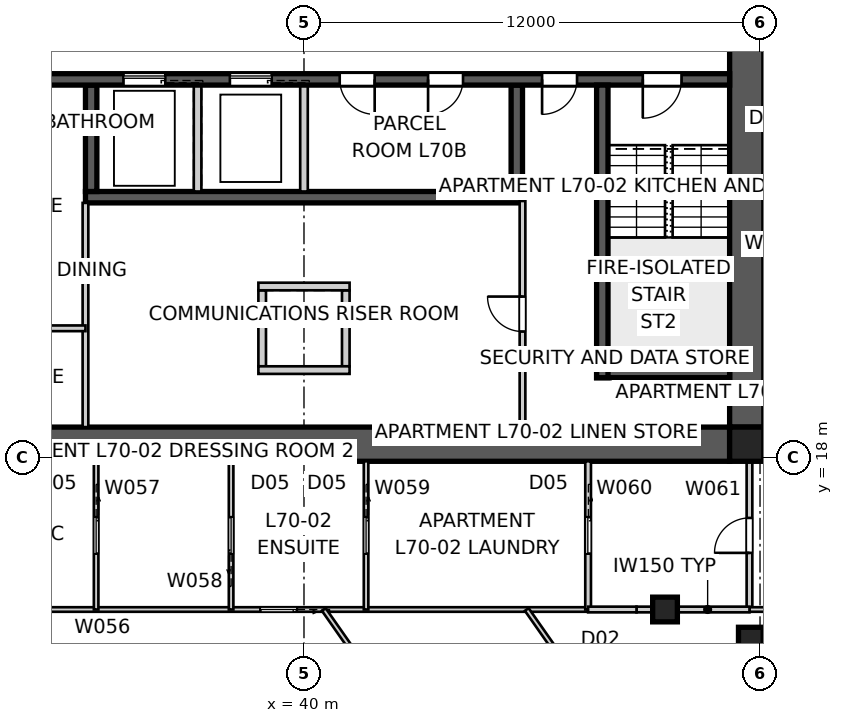
"""IFC4 building model, lengths in metres.
Left out: names, types, materials, properties, quantities, classifications, styles, units other than length and angle.
Written with IfcOpenShell. Run it as: python <this file> out.ifc"""

import sys

from ifc_helpers import new_model, si_unit, direction, frame, frame_2d, origin, origin_2d, place, context, subcontext, project, spatial, polyline, rectangle, outline, extrude, element, fill, save


model = new_model("IFC4")
c1 = context("Model", 3, precision=1e-05, world=origin(), true_north=direction((0.0, 1.0)))
c2 = subcontext(c1, "Body", "Model", "MODEL_VIEW")
j1 = project(units=[si_unit("LENGTHUNIT", "METRE"), si_unit("PLANEANGLEUNIT", "RADIAN")], contexts=[c1])
p1 = place(None, origin())
s1 = spatial("IfcSite", under=j1, at=p1, CompositionType="ELEMENT")
p2 = place(p1, origin())
s2 = spatial("IfcBuilding", under=s1, at=p2, CompositionType="ELEMENT")
p3 = place(p2, frame((0.0, 0.0, 254.0)))
s3 = spatial("IfcBuildingStorey", under=s2, at=p3, CompositionType="ELEMENT", Elevation=254.0)
p4 = place(p3, frame((51.2, 18.35, 0.0), z_axis=(0.0, 0.0, 1.0), x_axis=(-1.0, 0.0, 0.0)))
e1 = element("IfcWall", 1, at=p4, inside=s3, PredefinedType="SHEAR", context=c2, shape_type="SweptSolid", body=[
    extrude(outline(polyline([(0.0, -0.45), (22.4, -0.45), (22.4, -0.025), (22.85, -0.025), (22.85, 0.025), (22.4, 0.025), (22.4, 0.45), (0.0, 0.45), (0.0, 0.025), (-0.45, 0.025), (-0.45, -0.025), (0.0, -0.025), (0.0, -0.45)])), origin(), (0.0, 0.0, 1.0), 3.4),
])
p5 = place(p3, frame((51.65, 18.8, 0.0), z_axis=(0.0, 0.0, 1.0), x_axis=(0.0, 1.0, 0.0)))
e2 = element("IfcWall", 2, at=p5, inside=s3, PredefinedType="SHEAR", context=c2, shape_type="SweptSolid", body=[
    extrude(outline(polyline([(0.0, -0.45), (22.4, -0.45), (22.4, -0.025), (22.85, -0.025), (22.85, 0.025), (22.4, 0.025), (22.4, 0.45), (0.0, 0.45), (0.0, 0.025), (-0.45, 0.025), (-0.45, -0.025), (0.0, -0.025), (0.0, -0.45)])), origin(), (0.0, 0.0, 1.0), 3.4),
])
p6 = place(p5, frame((11.14, 0.0, 0.0)))
e3 = element("IfcOpeningElement", 3, at=p6, cuts=e2, PredefinedType="OPENING", context=c2, shape_type="SweptSolid", body=[
    extrude(rectangle(XDim=1.02, YDim=2.4, at=frame_2d((0.51, 1.2))), frame((0.0, 0.46, 0.0), z_axis=(0.0, -1.0, 0.0), x_axis=(1.0, 0.0, 0.0)), (0.0, 0.0, 1.0), 0.92),
])
p7 = place(p3, frame((51.2, 27.95, 0.0), z_axis=(0.0, 0.0, 1.0), x_axis=(-1.0, 0.0, 0.0)))
e4 = element("IfcWall", 4, at=p7, inside=s3, PredefinedType="SHEAR", context=c2, shape_type="SweptSolid", body=[
    extrude(rectangle(XDim=22.4, YDim=0.3, at=frame_2d((11.2, 0.0))), origin(), (0.0, 0.0, 1.0), 3.4),
])
p8 = place(p7, frame((19.04, 0.0, 0.0)))
e5 = element("IfcOpeningElement", 5, at=p8, cuts=e4, PredefinedType="OPENING", context=c2, shape_type="SweptSolid", body=[
    extrude(rectangle(XDim=0.92, YDim=2.1, at=frame_2d((0.46, 1.05))), frame((0.0, 0.16, 0.0), z_axis=(0.0, -1.0, 0.0), x_axis=(1.0, 0.0, 0.0)), (0.0, 0.0, 1.0), 0.32),
])
p9 = place(p7, frame((1.265, 0.0, 0.0)))
e6 = element("IfcOpeningElement", 6, at=p9, cuts=e4, PredefinedType="OPENING", context=c2, shape_type="SweptSolid", body=[
    extrude(rectangle(XDim=1.02, YDim=2.1, at=frame_2d((0.51, 1.05))), frame((0.0, 0.16, 0.0), z_axis=(0.0, -1.0, 0.0), x_axis=(1.0, 0.0, 0.0)), (0.0, 0.0, 1.0), 0.32),
])
p10 = place(p7, frame((4.015, 0.0, 0.0)))
e7 = element("IfcOpeningElement", 7, at=p10, cuts=e4, PredefinedType="OPENING", context=c2, shape_type="SweptSolid", body=[
    extrude(rectangle(XDim=0.92, YDim=2.1, at=frame_2d((0.46, 1.05))), frame((0.0, 0.16, 0.0), z_axis=(0.0, -1.0, 0.0), x_axis=(1.0, 0.0, 0.0)), (0.0, 0.0, 1.0), 0.32),
])
p11 = place(p7, frame((9.34, 0.0, 0.0)))
e8 = element("IfcOpeningElement", 8, at=p11, cuts=e4, PredefinedType="OPENING", context=c2, shape_type="SweptSolid", body=[
    extrude(rectangle(XDim=0.92, YDim=2.1, at=frame_2d((0.46, 1.05))), frame((0.0, 0.16, 0.0), z_axis=(0.0, -1.0, 0.0), x_axis=(1.0, 0.0, 0.0)), (0.0, 0.0, 1.0), 0.32),
])
p12 = place(p7, frame((7.015, 0.0, 0.0)))
e9 = element("IfcOpeningElement", 9, at=p12, cuts=e4, PredefinedType="OPENING", context=c2, shape_type="SweptSolid", body=[
    extrude(rectangle(XDim=0.92, YDim=2.1, at=frame_2d((0.46, 1.05))), frame((0.0, 0.16, 0.0), z_axis=(0.0, -1.0, 0.0), x_axis=(1.0, 0.0, 0.0)), (0.0, 0.0, 1.0), 0.32),
])
p13 = place(p7, frame((12.05, 0.0, 0.0)))
e10 = element("IfcOpeningElement", 10, at=p13, cuts=e4, PredefinedType="OPENING", context=c2, shape_type="SweptSolid", body=[
    extrude(rectangle(XDim=1.1, YDim=2.1, at=frame_2d((0.55, 1.05))), frame((0.0, 0.16, 0.0), z_axis=(0.0, -1.0, 0.0), x_axis=(1.0, 0.0, 0.0)), (0.0, 0.0, 1.0), 0.32),
])
p14 = place(p7, frame((14.85, 0.0, 0.0)))
e11 = element("IfcOpeningElement", 11, at=p14, cuts=e4, PredefinedType="OPENING", context=c2, shape_type="SweptSolid", body=[
    extrude(rectangle(XDim=1.1, YDim=2.1, at=frame_2d((0.55, 1.05))), frame((0.0, 0.16, 0.0), z_axis=(0.0, -1.0, 0.0), x_axis=(1.0, 0.0, 0.0)), (0.0, 0.0, 1.0), 0.32),
])
p15 = place(p3, frame((45.75, 24.85, 0.0), z_axis=(0.0, 0.0, 1.0), x_axis=(-1.0, 0.0, 0.0)))
e12 = element("IfcWall", 12, at=p15, inside=s3, PredefinedType="SHEAR", context=c2, shape_type="SweptSolid", body=[
    extrude(rectangle(XDim=11.5, YDim=0.3, at=frame_2d((5.75, 0.0))), origin(), (0.0, 0.0, 1.0), 3.4),
])
p16 = place(p3, frame((45.6, 27.8, 0.0), z_axis=(0.0, 0.0, 1.0), x_axis=(0.0, -1.0, 0.0)))
e13 = element("IfcWall", 13, at=p16, inside=s3, PredefinedType="SHEAR", context=c2, shape_type="SweptSolid", body=[
    extrude(rectangle(XDim=2.8, YDim=0.3, at=frame_2d((1.4, 0.0))), origin(), (0.0, 0.0, 1.0), 3.4),
])
for number, where, z_axis, x_axis in (
    (14, (40.0, 27.8, 0.0), (0.0, 0.0, 1.0), (0.0, -1.0, 0.0)),
    (15, (37.2, 27.8, 0.0), (0.0, 0.0, 1.0), (0.0, -1.0, 0.0)),
):
    element("IfcWall", number, at=place(p3, frame(where, z_axis=z_axis, x_axis=x_axis)), inside=s3, PredefinedType="SOLIDWALL", context=c2, shape_type="SweptSolid", body=[
        extrude(rectangle(XDim=2.8, YDim=0.2, at=frame_2d((1.4, 0.0))), origin(), (0.0, 0.0, 1.0), 3.4),
    ])
p17 = place(p3, frame((34.4, 27.8, 0.0), z_axis=(0.0, 0.0, 1.0), x_axis=(0.0, -1.0, 0.0)))
e16 = element("IfcWall", 16, at=p17, inside=s3, PredefinedType="SHEAR", context=c2, shape_type="SweptSolid", body=[
    extrude(rectangle(XDim=2.8, YDim=0.3, at=frame_2d((1.4, 0.0))), origin(), (0.0, 0.0, 1.0), 3.4),
])
p18 = place(p3, frame((47.85, 27.8, 0.0), z_axis=(0.0, 0.0, 1.0), x_axis=(0.0, -1.0, 0.0)))
e17 = element("IfcWall", 17, at=p18, inside=s3, PredefinedType="SHEAR", context=c2, shape_type="SweptSolid", body=[
    extrude(rectangle(XDim=7.7, YDim=0.3, at=frame_2d((3.85, 0.0))), origin(), (0.0, 0.0, 1.0), 3.4),
])
p19 = place(p3, frame((51.2, 20.25, 0.0), z_axis=(0.0, 0.0, 1.0), x_axis=(-1.0, 0.0, 0.0)))
e18 = element("IfcWall", 18, at=p19, inside=s3, PredefinedType="SHEAR", context=c2, shape_type="SweptSolid", body=[
    extrude(rectangle(XDim=3.5, YDim=0.3, at=frame_2d((1.75, 0.0))), origin(), (0.0, 0.0, 1.0), 3.4),
])
for number, where, z_axis, x_axis in (
    (19, (38.9, 22.4, 0.0), (0.0, 0.0, 1.0), (0.0, -1.0, 0.0)),
    (20, (41.1, 22.4, 0.0), (0.0, 0.0, 1.0), (0.0, -1.0, 0.0)),
):
    element("IfcWall", number, at=place(p3, frame(where, z_axis=z_axis, x_axis=x_axis)), inside=s3, PredefinedType="SOLIDWALL", context=c2, shape_type="SweptSolid", body=[
        extrude(rectangle(XDim=2.0, YDim=0.2, at=frame_2d((1.0, 0.0))), origin(), (0.0, 0.0, 1.0), 3.4),
    ])
for number, where, z_axis, x_axis in (
    (21, (38.8, 22.5, 0.0), (0.0, 0.0, 1.0), (1.0, 0.0, 0.0)),
    (22, (38.8, 20.3, 0.0), (0.0, 0.0, 1.0), (1.0, 0.0, 0.0)),
):
    element("IfcWall", number, at=place(p3, frame(where, z_axis=z_axis, x_axis=x_axis)), inside=s3, PredefinedType="SOLIDWALL", context=c2, shape_type="SweptSolid", body=[
        extrude(rectangle(XDim=2.4, YDim=0.2, at=frame_2d((1.2, 0.0))), origin(), (0.0, 0.0, 1.0), 3.4),
    ])
p20 = place(p3, frame((51.65, 18.35, 0.0), z_axis=(0.0, 0.0, 1.0), x_axis=(1.0, 0.0, 0.0)))
e23 = element("IfcColumn", 23, at=p20, inside=s3, PredefinedType="COLUMN", context=c2, shape_type="SweptSolid", body=[
    extrude(rectangle(XDim=0.9, YDim=0.9, at=origin_2d()), origin(), (0.0, 0.0, 1.0), 3.4),
])
for number, where, z_axis, x_axis in (
    (24, (51.758, 13.207, 0.0), (0.0, 0.0, 1.0), (1.0, 0.0, 0.0)),
    (25, (49.5, 14.0, 0.0), (0.0, 0.0, 1.0), (1.0, 0.0, 0.0)),
):
    element("IfcColumn", number, at=place(p3, frame(where, z_axis=z_axis, x_axis=x_axis)), inside=s3, PredefinedType="COLUMN", context=c2, shape_type="SweptSolid", body=[
        extrude(rectangle(XDim=0.65, YDim=0.65, at=origin_2d()), origin(), (0.0, 0.0, 1.0), 3.4),
    ])
p21 = place(p3, frame((45.75, 18.8, 0.0), z_axis=(0.0, 0.0, 1.0), x_axis=(0.0, 1.0, 0.0)))
e26 = element("IfcWall", 26, at=p21, inside=s3, PredefinedType="SOLIDWALL", context=c2, shape_type="SweptSolid", body=[
    extrude(rectangle(XDim=5.95, YDim=0.15, at=frame_2d((2.975, 0.0))), origin(), (0.0, 0.0, 1.0), 3.25),
])
p22 = place(p21, frame((2.515, 0.0, 0.0)))
e27 = element("IfcOpeningElement", 27, at=p22, cuts=e26, PredefinedType="OPENING", context=c2, shape_type="SweptSolid", body=[
    extrude(rectangle(XDim=0.92, YDim=2.1, at=frame_2d((0.46, 1.05))), frame((0.0, 0.085, 0.0), z_axis=(0.0, -1.0, 0.0), x_axis=(1.0, 0.0, 0.0)), (0.0, 0.0, 1.0), 0.17),
])
p23 = place(p3, frame((34.25, 18.8, 0.0), z_axis=(0.0, 0.0, 1.0), x_axis=(0.0, 1.0, 0.0)))
e28 = element("IfcWall", 28, at=p23, inside=s3, PredefinedType="SOLIDWALL", context=c2, shape_type="SweptSolid", body=[
    extrude(rectangle(XDim=5.9, YDim=0.15, at=frame_2d((2.95, 0.0))), origin(), (0.0, 0.0, 1.0), 3.25),
])
p24 = place(p3, frame((34.25, 21.4, 0.0), z_axis=(0.0, 0.0, 1.0), x_axis=(-1.0, 0.0, 0.0)))
e29 = element("IfcWall", 29, at=p24, inside=s3, PredefinedType="SOLIDWALL", context=c2, shape_type="SweptSolid", body=[
    extrude(rectangle(XDim=5.45, YDim=0.15, at=frame_2d((2.725, 0.0))), origin(), (0.0, 0.0, 1.0), 3.25),
])
p25 = place(p24, frame((2.265, 0.0, 0.0)))
e30 = element("IfcOpeningElement", 30, at=p25, cuts=e29, PredefinedType="OPENING", context=c2, shape_type="SweptSolid", body=[
    extrude(rectangle(XDim=0.92, YDim=2.1, at=frame_2d((0.46, 1.05))), frame((0.0, 0.085, 0.0), z_axis=(0.0, -1.0, 0.0), x_axis=(1.0, 0.0, 0.0)), (0.0, 0.0, 1.0), 0.17),
])
p26 = place(p3, frame((47.476, 14.0, 0.0), z_axis=(0.0, 0.0, 1.0), x_axis=(-1.0, 0.0, 0.0)))
e31 = element("IfcWall", 31, at=p26, inside=s3, PredefinedType="PARTITIONING", context=c2, shape_type="SweptSolid", body=[
    extrude(rectangle(XDim=22.471, YDim=0.12, at=frame_2d((11.235, 0.0))), origin(), (0.0, 0.0, 1.0), 2.549),
])
p27 = place(p26, frame((7.664, 0.0, 0.0)))
e32 = element("IfcOpeningElement", 32, at=p27, cuts=e31, PredefinedType="OPENING", context=c2, shape_type="SweptSolid", body=[
    extrude(rectangle(XDim=0.96, YDim=2.1, at=frame_2d((0.48, 1.05))), frame((0.0, 0.07, 0.0), z_axis=(0.0, -1.0, 0.0), x_axis=(1.0, 0.0, 0.0)), (0.0, 0.0, 1.0), 0.14),
])
p28 = place(p3, frame((34.53, 17.9, 0.0), z_axis=(0.0, 0.0, 1.0), x_axis=(0.0, -1.0, 0.0)))
e33 = element("IfcWall", 33, at=p28, inside=s3, PredefinedType="PARTITIONING", context=c2, shape_type="SweptSolid", body=[
    extrude(rectangle(XDim=3.9, YDim=0.12, at=frame_2d((1.95, 0.0))), origin(), (0.0, 0.0, 1.0), 3.25),
])
p29 = place(p28, frame((1.47, 0.0, 0.0)))
e34 = element("IfcOpeningElement", 34, at=p29, cuts=e33, PredefinedType="OPENING", context=c2, shape_type="SweptSolid", body=[
    extrude(rectangle(XDim=0.96, YDim=2.1, at=frame_2d((0.48, 1.05))), frame((0.0, 0.07, 0.0), z_axis=(0.0, -1.0, 0.0), x_axis=(1.0, 0.0, 0.0)), (0.0, 0.0, 1.0), 0.14),
])
p30 = place(p3, frame((38.082, 14.0, 0.0), z_axis=(0.0, 0.0, 1.0), x_axis=(0.0, 1.0, 0.0)))
e35 = element("IfcWall", 35, at=p30, inside=s3, PredefinedType="PARTITIONING", context=c2, shape_type="SweptSolid", body=[
    extrude(rectangle(XDim=3.9, YDim=0.12, at=frame_2d((1.95, 0.0))), origin(), (0.0, 0.0, 1.0), 3.25),
])
p31 = place(p30, frame((1.47, 0.0, 0.0)))
e36 = element("IfcOpeningElement", 36, at=p31, cuts=e35, PredefinedType="OPENING", context=c2, shape_type="SweptSolid", body=[
    extrude(rectangle(XDim=0.96, YDim=2.1, at=frame_2d((0.48, 1.05))), frame((0.0, 0.07, 0.0), z_axis=(0.0, -1.0, 0.0), x_axis=(1.0, 0.0, 0.0)), (0.0, 0.0, 1.0), 0.14),
])
p32 = place(p3, frame((41.634, 17.9, 0.0), z_axis=(0.0, 0.0, 1.0), x_axis=(0.0, -1.0, 0.0)))
e37 = element("IfcWall", 37, at=p32, inside=s3, PredefinedType="PARTITIONING", context=c2, shape_type="SweptSolid", body=[
    extrude(rectangle(XDim=3.9, YDim=0.12, at=frame_2d((1.95, 0.0))), origin(), (0.0, 0.0, 1.0), 3.25),
])
p33 = place(p32, frame((1.47, 0.0, 0.0)))
e38 = element("IfcOpeningElement", 38, at=p33, cuts=e37, PredefinedType="OPENING", context=c2, shape_type="SweptSolid", body=[
    extrude(rectangle(XDim=0.96, YDim=2.1, at=frame_2d((0.48, 1.05))), frame((0.0, 0.07, 0.0), z_axis=(0.0, -1.0, 0.0), x_axis=(1.0, 0.0, 0.0)), (0.0, 0.0, 1.0), 0.14),
])
p34 = place(p3, frame((47.476, 17.9, 0.0), z_axis=(0.0, 0.0, 1.0), x_axis=(0.0, -1.0, 0.0)))
e39 = element("IfcWall", 39, at=p34, inside=s3, PredefinedType="SOLIDWALL", context=c2, shape_type="SweptSolid", body=[
    extrude(rectangle(XDim=3.9, YDim=0.15, at=frame_2d((1.95, 0.0))), origin(), (0.0, 0.0, 1.0), 3.25),
])
p35 = place(p34, frame((1.47, 0.0, 0.0)))
e40 = element("IfcOpeningElement", 40, at=p35, cuts=e39, PredefinedType="OPENING", context=c2, shape_type="SweptSolid", body=[
    extrude(rectangle(XDim=0.96, YDim=2.1, at=frame_2d((0.48, 1.05))), frame((0.0, 0.085, 0.0), z_axis=(0.0, -1.0, 0.0), x_axis=(1.0, 0.0, 0.0)), (0.0, 0.0, 1.0), 0.17),
])
p36 = place(p3, frame((51.722, 14.0, 0.0), z_axis=(0.0, 0.0, 1.0), x_axis=(0.0, 1.0, 0.0)))
e41 = element("IfcWall", 41, at=p36, inside=s3, PredefinedType="SOLIDWALL", context=c2, shape_type="SweptSolid", body=[
    extrude(rectangle(XDim=4.82, YDim=0.15, at=frame_2d((2.41, 0.0))), origin(), (0.0, 0.0, 1.0), 3.25),
])
p37 = place(p36, frame((1.49, 0.0, 0.0)))
e42 = element("IfcOpeningElement", 42, at=p37, cuts=e41, PredefinedType="OPENING", context=c2, shape_type="SweptSolid", body=[
    extrude(rectangle(XDim=0.92, YDim=2.1, at=frame_2d((0.46, 1.05))), frame((0.0, 0.085, 0.0), z_axis=(0.0, -1.0, 0.0), x_axis=(1.0, 0.0, 0.0)), (0.0, 0.0, 1.0), 0.17),
])
p38 = place(p3, frame((51.777, 18.118, 0.0), z_axis=(0.0, 0.0, 1.0), x_axis=(1.0, 0.0, 0.0)))
e43 = element("IfcWall", 43, at=p38, inside=s3, PredefinedType="PARTITIONING", context=c2, shape_type="SweptSolid", body=[
    extrude(rectangle(XDim=4.223, YDim=0.12, at=frame_2d((2.111, 0.0))), origin(), (0.0, 0.0, 1.0), 3.25),
])
p39 = place(p38, frame((1.812, 0.0, 0.0)))
e44 = element("IfcOpeningElement", 44, at=p39, cuts=e43, PredefinedType="OPENING", context=c2, shape_type="SweptSolid", body=[
    extrude(rectangle(XDim=0.92, YDim=2.1, at=frame_2d((0.46, 1.05))), frame((0.0, 0.07, 0.0), z_axis=(0.0, -1.0, 0.0), x_axis=(1.0, 0.0, 0.0)), (0.0, 0.0, 1.0), 0.14),
])
p40 = place(p3, frame((54.564, 14.0, 0.0), z_axis=(0.0, 0.0, 1.0), x_axis=(-1.0, 0.0, 0.0)))
e45 = element("IfcWall", 45, at=p40, inside=s3, PredefinedType="PARTITIONING", context=c2, shape_type="SweptSolid", body=[
    extrude(rectangle(XDim=2.842, YDim=0.12, at=frame_2d((1.421, 0.0))), origin(), (0.0, 0.0, 1.0), 3.25),
])
p41 = place(p40, frame((0.926, 0.0, 0.0)))
e46 = element("IfcOpeningElement", 46, at=p41, cuts=e45, PredefinedType="OPENING", context=c2, shape_type="SweptSolid", body=[
    extrude(rectangle(XDim=0.92, YDim=2.34, at=frame_2d((0.46, 1.17))), frame((0.0, 0.07, 0.0), z_axis=(0.0, -1.0, 0.0), x_axis=(1.0, 0.0, 0.0)), (0.0, 0.0, 1.0), 0.14),
])
p42 = place(p3, frame((51.722, 14.0, 0.0), z_axis=(0.0, 0.0, 1.0), x_axis=(-1.0, 0.0, 0.0)))
e47 = element("IfcWall", 47, at=p42, inside=s3, PredefinedType="SOLIDWALL", context=c2, shape_type="SweptSolid", body=[
    extrude(rectangle(XDim=2.202, YDim=0.15, at=frame_2d((1.101, 0.0))), origin(), (0.0, 0.0, 1.0), 3.25),
])
p43 = place(p3, frame((49.521, 14.0, 0.0), z_axis=(0.0, 0.0, 1.0), x_axis=(-1.0, 0.0, 0.0)))
e48 = element("IfcWall", 48, at=p43, inside=s3, PredefinedType="SOLIDWALL", context=c2, shape_type="SweptSolid", body=[
    extrude(rectangle(XDim=0.771, YDim=0.15, at=frame_2d((0.385, 0.0))), origin(), (0.0, 0.0, 1.0), 2.549),
])
p44 = place(p3, frame((48.75, 14.0, 0.0), z_axis=(0.0, 0.0, 1.0), x_axis=(-1.0, 0.0, 0.0)))
e49 = element("IfcWall", 49, at=p44, inside=s3, PredefinedType="SOLIDWALL", context=c2, shape_type="SweptSolid", body=[
    extrude(rectangle(XDim=1.274, YDim=0.15, at=frame_2d((0.637, 0.0))), origin(), (0.0, 0.0, 1.0), 3.25),
])
p45 = place(p3, frame((40.521, 14.0, 0.0), z_axis=(0.0, 0.0, 1.0), x_axis=(0.573574225095, -0.819153592623, 0.0)))
e50 = element("IfcWall", 50, at=p45, inside=s3, PredefinedType="PARTITIONING", context=c2, shape_type="SweptSolid", body=[
    extrude(rectangle(XDim=8.054, YDim=0.12, at=frame_2d((4.027, 0.0))), origin(), (0.0, 0.0, 1.0), 3.25),
])
p46 = place(p3, frame((45.862, 14.0, 0.0), z_axis=(0.0, 0.0, 1.0), x_axis=(0.57358708951, -0.819144584763, 0.0)))
e51 = element("IfcWall", 51, at=p46, inside=s3, PredefinedType="PARTITIONING", context=c2, shape_type="SweptSolid", body=[
    extrude(rectangle(XDim=4.991, YDim=0.12, at=frame_2d((2.496, 0.0))), origin(), (0.0, 0.0, 1.0), 3.25),
])
p47 = place(p46, frame((2.055, 0.0, 0.0)))
e52 = element("IfcOpeningElement", 52, at=p47, cuts=e51, PredefinedType="OPENING", context=c2, shape_type="SweptSolid", body=[
    extrude(rectangle(XDim=0.92, YDim=2.34, at=frame_2d((0.46, 1.17))), frame((0.0, 0.07, 0.0), z_axis=(0.0, -1.0, 0.0), x_axis=(1.0, 0.0, 0.0)), (0.0, 0.0, 1.0), 0.14),
])
p48 = place(p9, origin())
e53 = element("IfcDoor", 53, at=p48, inside=s3, OperationType="SINGLE_SWING_RIGHT", PredefinedType="DOOR", context=c2, shape_type="SweptSolid", body=[
    extrude(rectangle(XDim=1.02, YDim=2.1, at=frame_2d((0.51, 1.05))), frame((0.0, 0.025, 0.0), z_axis=(0.0, -1.0, 0.0), x_axis=(1.0, 0.0, 0.0)), (0.0, 0.0, 1.0), 0.05),
])
fill(e6, e53)
p49 = place(p10, origin())
e54 = element("IfcDoor", 54, at=p49, inside=s3, OperationType="SINGLE_SWING_RIGHT", PredefinedType="DOOR", context=c2, shape_type="SweptSolid", body=[
    extrude(rectangle(XDim=0.92, YDim=2.1, at=frame_2d((0.46, 1.05))), frame((0.0, 0.025, 0.0), z_axis=(0.0, -1.0, 0.0), x_axis=(1.0, 0.0, 0.0)), (0.0, 0.0, 1.0), 0.05),
])
fill(e7, e54)
p50 = place(p22, origin())
e55 = element("IfcDoor", 55, at=p50, inside=s3, OperationType="SINGLE_SWING_RIGHT", PredefinedType="DOOR", context=c2, shape_type="SweptSolid", body=[
    extrude(rectangle(XDim=0.92, YDim=2.1, at=frame_2d((0.46, 1.05))), frame((0.0, 0.025, 0.0), z_axis=(0.0, -1.0, 0.0), x_axis=(1.0, 0.0, 0.0)), (0.0, 0.0, 1.0), 0.05),
])
fill(e27, e55)
p51 = place(p37, origin())
e56 = element("IfcDoor", 56, at=p51, inside=s3, OperationType="SINGLE_SWING_LEFT", PredefinedType="DOOR", context=c2, shape_type="SweptSolid", body=[
    extrude(rectangle(XDim=0.92, YDim=2.1, at=frame_2d((0.46, 1.05))), frame((0.0, 0.025, 0.0), z_axis=(0.0, -1.0, 0.0), x_axis=(1.0, 0.0, 0.0)), (0.0, 0.0, 1.0), 0.05),
])
fill(e42, e56)
p52 = place(p35, origin())
e57 = element("IfcDoor", 57, at=p52, inside=s3, OperationType="SLIDING_TO_LEFT", PredefinedType="DOOR", context=c2, shape_type="SweptSolid", body=[
    extrude(rectangle(XDim=0.96, YDim=2.1, at=frame_2d((0.48, 1.05))), frame((0.0, 0.025, 0.0), z_axis=(0.0, -1.0, 0.0), x_axis=(1.0, 0.0, 0.0)), (0.0, 0.0, 1.0), 0.05),
])
fill(e40, e57)
p53 = place(p33, origin())
e58 = element("IfcDoor", 58, at=p53, inside=s3, OperationType="SLIDING_TO_LEFT", PredefinedType="DOOR", context=c2, shape_type="SweptSolid", body=[
    extrude(rectangle(XDim=0.96, YDim=2.1, at=frame_2d((0.48, 1.05))), frame((0.0, 0.025, 0.0), z_axis=(0.0, -1.0, 0.0), x_axis=(1.0, 0.0, 0.0)), (0.0, 0.0, 1.0), 0.05),
])
fill(e38, e58)
p54 = place(p31, origin())
e59 = element("IfcDoor", 59, at=p54, inside=s3, OperationType="SLIDING_TO_LEFT", PredefinedType="DOOR", context=c2, shape_type="SweptSolid", body=[
    extrude(rectangle(XDim=0.96, YDim=2.1, at=frame_2d((0.48, 1.05))), frame((0.0, 0.025, 0.0), z_axis=(0.0, -1.0, 0.0), x_axis=(1.0, 0.0, 0.0)), (0.0, 0.0, 1.0), 0.05),
])
fill(e36, e59)
p55 = place(p27, origin())
e60 = element("IfcDoor", 60, at=p55, inside=s3, OperationType="SLIDING_TO_LEFT", PredefinedType="DOOR", context=c2, shape_type="SweptSolid", body=[
    extrude(rectangle(XDim=0.96, YDim=2.1, at=frame_2d((0.48, 1.05))), frame((0.0, 0.025, 0.0), z_axis=(0.0, -1.0, 0.0), x_axis=(1.0, 0.0, 0.0)), (0.0, 0.0, 1.0), 0.05),
])
fill(e32, e60)
p56 = place(p29, origin())
e61 = element("IfcDoor", 61, at=p56, inside=s3, OperationType="SLIDING_TO_LEFT", PredefinedType="DOOR", context=c2, shape_type="SweptSolid", body=[
    extrude(rectangle(XDim=0.96, YDim=2.1, at=frame_2d((0.48, 1.05))), frame((0.0, 0.025, 0.0), z_axis=(0.0, -1.0, 0.0), x_axis=(1.0, 0.0, 0.0)), (0.0, 0.0, 1.0), 0.05),
])
fill(e34, e61)
p57 = place(p11, origin())
e62 = element("IfcDoor", 62, at=p57, inside=s3, OperationType="SINGLE_SWING_LEFT", PredefinedType="DOOR", context=c2, shape_type="SweptSolid", body=[
    extrude(rectangle(XDim=0.92, YDim=2.1, at=frame_2d((0.46, 1.05))), frame((0.0, 0.025, 0.0), z_axis=(0.0, -1.0, 0.0), x_axis=(1.0, 0.0, 0.0)), (0.0, 0.0, 1.0), 0.05),
])
fill(e8, e62)
p58 = place(p12, origin())
e63 = element("IfcDoor", 63, at=p58, inside=s3, OperationType="SINGLE_SWING_RIGHT", PredefinedType="DOOR", context=c2, shape_type="SweptSolid", body=[
    extrude(rectangle(XDim=0.92, YDim=2.1, at=frame_2d((0.46, 1.05))), frame((0.0, 0.025, 0.0), z_axis=(0.0, -1.0, 0.0), x_axis=(1.0, 0.0, 0.0)), (0.0, 0.0, 1.0), 0.05),
])
fill(e9, e63)
p59 = place(p13, origin())
e64 = element("IfcDoor", 64, at=p59, inside=s3, OperationType="SLIDING_TO_LEFT", PredefinedType="DOOR", context=c2, shape_type="SweptSolid", body=[
    extrude(rectangle(XDim=1.1, YDim=2.1, at=frame_2d((0.55, 1.05))), frame((0.0, 0.025, 0.0), z_axis=(0.0, -1.0, 0.0), x_axis=(1.0, 0.0, 0.0)), (0.0, 0.0, 1.0), 0.05),
])
fill(e10, e64)
p60 = place(p14, origin())
e65 = element("IfcDoor", 65, at=p60, inside=s3, OperationType="SLIDING_TO_LEFT", PredefinedType="DOOR", context=c2, shape_type="SweptSolid", body=[
    extrude(rectangle(XDim=1.1, YDim=2.1, at=frame_2d((0.55, 1.05))), frame((0.0, 0.025, 0.0), z_axis=(0.0, -1.0, 0.0), x_axis=(1.0, 0.0, 0.0)), (0.0, 0.0, 1.0), 0.05),
])
fill(e11, e65)
save(model, sys.argv[1])
